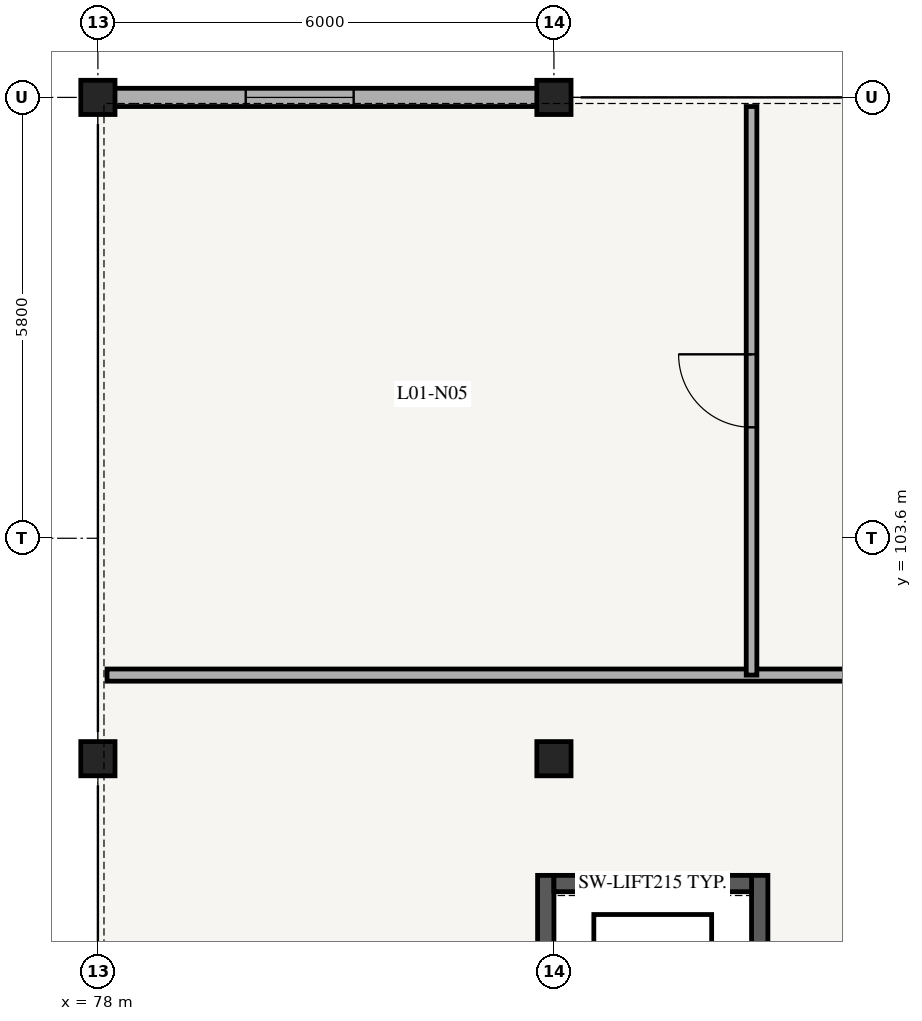
"""IFC4 building model, lengths in metres.
Left out: names, types, materials, properties, quantities, classifications, styles, units other than length and angle.
Written with IfcOpenShell. Run it as: python <this file> out.ifc"""

import sys

from ifc_helpers import new_model, si_unit, direction, frame, frame_2d, origin, origin_2d, place, context, subcontext, project, spatial, rectangle, extrude, element, fill, save


model = new_model("IFC4")
c1 = context("Model", 3, precision=1e-05, world=origin(), true_north=direction((0.0, 1.0)))
c2 = subcontext(c1, "Body", "Model", "MODEL_VIEW")
j1 = project(units=[si_unit("LENGTHUNIT", "METRE"), si_unit("PLANEANGLEUNIT", "RADIAN")], contexts=[c1])
p1 = place(None, origin())
s1 = spatial("IfcSite", under=j1, at=p1, CompositionType="ELEMENT")
p2 = place(p1, origin())
s2 = spatial("IfcBuilding", under=s1, at=p2, CompositionType="ELEMENT")
p3 = place(p2, frame((0.0, 0.0, 4.76)))
s3 = spatial("IfcBuildingStorey", under=s2, at=p3, CompositionType="ELEMENT", Elevation=4.76)
p4 = place(p3, frame((83.893, 96.135, 0.0), z_axis=(0.0, 0.0, 1.0), x_axis=(0.0, 1.0, 0.0)))
e1 = element("IfcWall", 1, at=p4, inside=s3, PredefinedType="SHEAR", context=c2, shape_type="SweptSolid", body=[
    extrude(rectangle(XDim=3.03, YDim=0.215, at=frame_2d((1.515, 0.0))), origin(), (0.0, 0.0, 1.0), 3.83),
])
p5 = place(p4, frame((0.9, 0.0, 0.0)))
e2 = element("IfcOpeningElement", 2, at=p5, cuts=e1, PredefinedType="OPENING", context=c2, shape_type="SweptSolid", body=[
    extrude(rectangle(XDim=0.95, YDim=2.15, at=frame_2d((0.475, 1.075))), frame((0.0, 0.117, 0.0), z_axis=(0.0, -1.0, 0.0), x_axis=(1.0, 0.0, 0.0)), (0.0, 0.0, 1.0), 0.235),
])
p6 = place(p3, frame((86.708, 96.135, 0.0), z_axis=(0.0, 0.0, 1.0), x_axis=(0.0, 1.0, 0.0)))
e3 = element("IfcWall", 3, at=p6, inside=s3, PredefinedType="SHEAR", context=c2, shape_type="SweptSolid", body=[
    extrude(rectangle(XDim=3.03, YDim=0.215, at=frame_2d((1.515, 0.0))), origin(), (0.0, 0.0, 1.0), 3.83),
])
p7 = place(p3, frame((84.0, 99.058, 0.0), z_axis=(0.0, 0.0, 1.0), x_axis=(1.0, 0.0, 0.0)))
e4 = element("IfcWall", 4, at=p7, inside=s3, PredefinedType="SHEAR", context=c2, shape_type="SweptSolid", body=[
    extrude(rectangle(XDim=2.6, YDim=0.215, at=frame_2d((1.3, 0.0))), origin(), (0.0, 0.0, 1.0), 3.83),
])
for number, where, z_axis, x_axis in (
    (5, (78.0, 100.7, 0.0), (0.0, 0.0, 1.0), (1.0, 0.0, 0.0)),
    (6, (78.0, 109.4, 0.0), (0.0, 0.0, 1.0), (1.0, 0.0, 0.0)),
    (7, (84.0, 100.7, 0.0), (0.0, 0.0, 1.0), (1.0, 0.0, 0.0)),
    (8, (84.0, 109.4, 0.0), (0.0, 0.0, 1.0), (1.0, 0.0, 0.0)),
):
    element("IfcColumn", number, at=place(p3, frame(where, z_axis=z_axis, x_axis=x_axis)), inside=s3, PredefinedType="COLUMN", context=c2, shape_type="SweptSolid", body=[
        extrude(rectangle(XDim=0.45, YDim=0.45, at=origin_2d()), origin(), (0.0, 0.0, 1.0), 4.08),
    ])
p8 = place(p3, frame((78.195, 109.4, 0.0), z_axis=(0.0, 0.0, 1.0), x_axis=(1.0, 0.0, 0.0)))
e9 = element("IfcWall", 9, at=p8, inside=s3, PredefinedType="SOLIDWALL", context=c2, shape_type="SweptSolid", body=[
    extrude(rectangle(XDim=5.61, YDim=0.24, at=frame_2d((2.805, 0.0))), origin(), (0.0, 0.0, 1.0), 3.34),
])
p9 = place(p8, frame((1.75, 0.0, 0.65)))
e10 = element("IfcOpeningElement", 10, at=p9, cuts=e9, PredefinedType="OPENING", context=c2, shape_type="SweptSolid", body=[
    extrude(rectangle(XDim=1.42, YDim=1.58, at=frame_2d((0.71, 0.79))), frame((0.0, 0.13, 0.0), z_axis=(0.0, -1.0, 0.0), x_axis=(1.0, 0.0, 0.0)), (0.0, 0.0, 1.0), 0.26),
])
p10 = place(p3, frame((78.12, 101.8, 0.0), z_axis=(0.0, 0.0, 1.0), x_axis=(1.0, 0.0, 0.0)))
e11 = element("IfcWall", 11, at=p10, inside=s3, PredefinedType="PARTITIONING", context=c2, shape_type="SweptSolid", body=[
    extrude(rectangle(XDim=29.76, YDim=0.16, at=frame_2d((14.88, 0.0))), origin(), (0.0, 0.0, 1.0), 2.86),
])
p11 = place(p10, frame((14.875, 0.0, 0.0)))
e12 = element("IfcOpeningElement", 12, at=p11, cuts=e11, PredefinedType="OPENING", context=c2, shape_type="SweptSolid", body=[
    extrude(rectangle(XDim=1.2, YDim=2.15, at=frame_2d((0.6, 1.075))), frame((0.0, 0.09, 0.0), z_axis=(0.0, -1.0, 0.0), x_axis=(1.0, 0.0, 0.0)), (0.0, 0.0, 1.0), 0.18),
])
p12 = place(p3, frame((86.6, 101.8, 0.0), z_axis=(0.0, 0.0, 1.0), x_axis=(0.0, 1.0, 0.0)))
e13 = element("IfcWall", 13, at=p12, inside=s3, PredefinedType="PLUMBINGWALL", context=c2, shape_type="SweptSolid", body=[
    extrude(rectangle(XDim=7.48, YDim=0.14, at=frame_2d((3.74, 0.0))), origin(), (0.0, 0.0, 1.0), 2.86),
])
p13 = place(p12, frame((3.26, 0.0, 0.0)))
e14 = element("IfcOpeningElement", 14, at=p13, cuts=e13, PredefinedType="OPENING", context=c2, shape_type="SweptSolid", body=[
    extrude(rectangle(XDim=0.96, YDim=2.1, at=frame_2d((0.48, 1.05))), frame((0.0, 0.08, 0.0), z_axis=(0.0, -1.0, 0.0), x_axis=(1.0, 0.0, 0.0)), (0.0, 0.0, 1.0), 0.16),
])
p14 = place(p9, origin())
e15 = element("IfcWindow", 15, at=p14, inside=s3, PartitioningType="SINGLE_PANEL", PredefinedType="WINDOW", context=c2, shape_type="SweptSolid", body=[
    extrude(rectangle(XDim=1.42, YDim=1.58, at=frame_2d((0.71, 0.79))), frame((0.0, 0.03, 0.0), z_axis=(0.0, -1.0, 0.0), x_axis=(1.0, 0.0, 0.0)), (0.0, 0.0, 1.0), 0.06),
])
fill(e10, e15)
p15 = place(p13, origin())
e16 = element("IfcDoor", 16, at=p15, inside=s3, OperationType="SINGLE_SWING_RIGHT", PredefinedType="DOOR", context=c2, shape_type="SweptSolid", body=[
    extrude(rectangle(XDim=0.96, YDim=2.1, at=frame_2d((0.48, 1.05))), frame((0.0, 0.025, 0.0), z_axis=(0.0, -1.0, 0.0), x_axis=(1.0, 0.0, 0.0)), (0.0, 0.0, 1.0), 0.05),
])
fill(e14, e16)
save(model, sys.argv[1])
